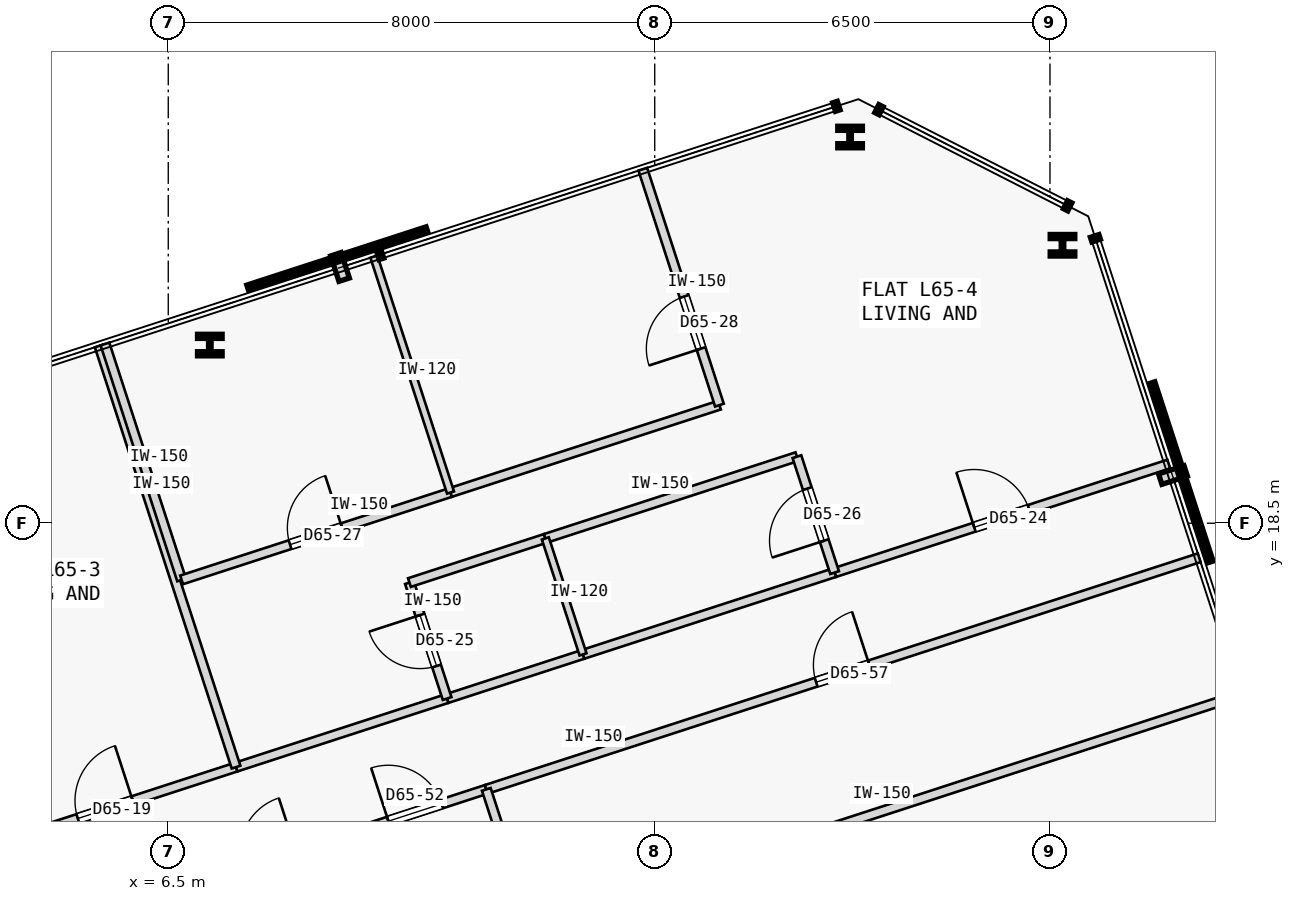
"""IFC4 building model, lengths in metres.
Left out: names, types, materials, properties, quantities, classifications, styles, units other than length and angle.
Written with IfcOpenShell. Run it as: python <this file> out.ifc"""

import sys

from ifc_helpers import new_model, si_unit, direction, frame, frame_2d, origin, origin_2d, place, context, subcontext, project, spatial, rectangle, i_section, extrude, element, fill, save


model = new_model("IFC4")
c1 = context("Model", 3, precision=1e-05, world=origin(), true_north=direction((0.0, 1.0)))
c2 = subcontext(c1, "Body", "Model", "MODEL_VIEW")
j1 = project(units=[si_unit("LENGTHUNIT", "METRE"), si_unit("PLANEANGLEUNIT", "RADIAN")], contexts=[c1])
p1 = place(None, origin())
s1 = spatial("IfcSite", under=j1, at=p1, CompositionType="ELEMENT")
p2 = place(p1, origin())
s2 = spatial("IfcBuilding", under=s1, at=p2, CompositionType="ELEMENT")
p3 = place(p2, frame((0.0, 0.0, 244.4)))
s3 = spatial("IfcBuildingStorey", under=s2, at=p3, CompositionType="ELEMENT", Elevation=244.4)
for number, where, z_axis, x_axis in (
    (1, (21.206, 23.071, 0.0), (0.0, 0.0, 1.0), (1.0, 0.0, 0.0)),
    (2, (17.713, 24.851, 0.0), (0.0, 0.0, 1.0), (1.0, 0.0, 0.0)),
    (3, (7.184, 21.43, 0.0), (0.0, 0.0, 1.0), (1.0, 0.0, 0.0)),
):
    element("IfcColumn", number, at=place(p3, frame(where, z_axis=z_axis, x_axis=x_axis)), inside=s3, PredefinedType="COLUMN", context=c2, shape_type="SweptSolid", body=[
        extrude(i_section(OverallWidth=0.405, OverallDepth=0.355, WebThickness=0.042, FlangeThickness=0.068, FilletRadius=0.015, at=origin_2d()), origin(), (0.0, 0.0, 1.0), 3.35),
    ])
p4 = place(p3, frame((3.314, 13.092, 0.0), z_axis=(0.0, 0.0, 1.0), x_axis=(0.951068976929, 0.308978641858, 0.0)))
e4 = element("IfcWall", 4, at=p4, inside=s3, PredefinedType="PARTITIONING", context=c2, shape_type="SweptSolid", body=[
    extrude(rectangle(XDim=4.522, YDim=0.15, at=frame_2d((2.261, 0.0))), origin(), (0.0, 0.0, 1.0), 3.125),
])
p5 = place(p4, frame((1.786, 0.0, 0.0)))
e5 = element("IfcOpeningElement", 5, at=p5, cuts=e4, PredefinedType="OPENING", context=c2, shape_type="SweptSolid", body=[
    extrude(rectangle(XDim=0.95, YDim=2.15, at=frame_2d((0.475, 1.075))), frame((0.0, 0.085, 0.0), z_axis=(0.0, -1.0, 0.0), x_axis=(1.0, 0.0, 0.0)), (0.0, 0.0, 1.0), 0.17),
])
p6 = place(p3, frame((7.615, 14.489, 0.0), z_axis=(0.0, 0.0, 1.0), x_axis=(0.951050780541, 0.309034646652, 0.0)))
e6 = element("IfcWall", 6, at=p6, inside=s3, PredefinedType="PARTITIONING", context=c2, shape_type="SweptSolid", body=[
    extrude(rectangle(XDim=3.65, YDim=0.15, at=frame_2d((1.825, 0.0))), origin(), (0.0, 0.0, 1.0), 3.125),
])
p7 = place(p3, frame((17.458, 17.688, 0.0), z_axis=(0.0, 0.0, 1.0), x_axis=(0.951064183239, 0.308993396953, 0.0)))
e7 = element("IfcWall", 7, at=p7, inside=s3, PredefinedType="PARTITIONING", context=c2, shape_type="SweptSolid", body=[
    extrude(rectangle(XDim=5.778, YDim=0.15, at=frame_2d((2.889, 0.0))), origin(), (0.0, 0.0, 1.0), 3.125),
])
p8 = place(p7, frame((2.414, 0.0, 0.0)))
e8 = element("IfcOpeningElement", 8, at=p8, cuts=e7, PredefinedType="OPENING", context=c2, shape_type="SweptSolid", body=[
    extrude(rectangle(XDim=0.95, YDim=2.15, at=frame_2d((0.475, 1.075))), frame((0.0, 0.085, 0.0), z_axis=(0.0, -1.0, 0.0), x_axis=(1.0, 0.0, 0.0)), (0.0, 0.0, 1.0), 0.17),
])
p9 = place(p3, frame((11.086, 15.617, 0.0), z_axis=(0.0, 0.0, 1.0), x_axis=(0.951045519245, 0.309050837767, 0.0)))
e9 = element("IfcWall", 9, at=p9, inside=s3, PredefinedType="PARTITIONING", context=c2, shape_type="SweptSolid", body=[
    extrude(rectangle(XDim=2.35, YDim=0.15, at=frame_2d((1.175, 0.0))), origin(), (0.0, 0.0, 1.0), 3.125),
])
p10 = place(p3, frame((13.321, 16.344, 0.0), z_axis=(0.0, 0.0, 1.0), x_axis=(0.951052627573, 0.309028962374, 0.0)))
e10 = element("IfcWall", 10, at=p10, inside=s3, PredefinedType="PARTITIONING", context=c2, shape_type="SweptSolid", body=[
    extrude(rectangle(XDim=4.35, YDim=0.15, at=frame_2d((2.175, 0.0))), origin(), (0.0, 0.0, 1.0), 3.125),
])
p11 = place(p3, frame((9.386, 13.362, 0.0), z_axis=(0.0, 0.0, 1.0), x_axis=(0.951052991774, 0.309027841526, 0.0)))
e11 = element("IfcWall", 11, at=p11, inside=s3, PredefinedType="PARTITIONING", context=c2, shape_type="SweptSolid", body=[
    extrude(rectangle(XDim=2.465, YDim=0.15, at=frame_2d((1.232, 0.0))), origin(), (0.0, 0.0, 1.0), 3.125),
])
p12 = place(p11, frame((0.772, 0.0, 0.0)))
e12 = element("IfcOpeningElement", 12, at=p12, cuts=e11, PredefinedType="OPENING", context=c2, shape_type="SweptSolid", body=[
    extrude(rectangle(XDim=0.92, YDim=2.15, at=frame_2d((0.46, 1.075))), frame((0.0, 0.085, 0.0), z_axis=(0.0, -1.0, 0.0), x_axis=(1.0, 0.0, 0.0)), (0.0, 0.0, 1.0), 0.17),
])
p13 = place(p3, frame((11.73, 14.123, 0.0), z_axis=(0.0, 0.0, 1.0), x_axis=(0.951060263663, 0.309005460926, 0.0)))
e13 = element("IfcWall", 13, at=p13, inside=s3, PredefinedType="PARTITIONING", context=c2, shape_type="SweptSolid", body=[
    extrude(rectangle(XDim=12.327, YDim=0.15, at=frame_2d((6.164, 0.0))), origin(), (0.0, 0.0, 1.0), 3.125),
])
p14 = place(p13, frame((5.704, 0.0, 0.0)))
e14 = element("IfcOpeningElement", 14, at=p14, cuts=e13, PredefinedType="OPENING", context=c2, shape_type="SweptSolid", body=[
    extrude(rectangle(XDim=0.92, YDim=2.15, at=frame_2d((0.46, 1.075))), frame((0.0, 0.085, 0.0), z_axis=(0.0, -1.0, 0.0), x_axis=(1.0, 0.0, 0.0)), (0.0, 0.0, 1.0), 0.17),
])
p15 = place(p3, frame((7.615, 14.489, 0.0), z_axis=(0.0, 0.0, 1.0), x_axis=(-0.309029230739, 0.951052540372, 0.0)))
e15 = element("IfcWall", 15, at=p15, inside=s3, PredefinedType="PARTITIONING", context=c2, shape_type="SweptSolid", body=[
    extrude(rectangle(XDim=7.284, YDim=0.15, at=frame_2d((3.642, 0.0))), origin(), (0.0, 0.0, 1.0), 3.125),
])
p16 = place(p3, frame((11.086, 15.617, 0.0), z_axis=(0.0, 0.0, 1.0), x_axis=(-0.309022749039, 0.951054646472, 0.0)))
e16 = element("IfcWall", 16, at=p16, inside=s3, PredefinedType="PARTITIONING", context=c2, shape_type="SweptSolid", body=[
    extrude(rectangle(XDim=2.005, YDim=0.15, at=frame_2d((1.002, 0.0))), origin(), (0.0, 0.0, 1.0), 3.125),
])
p17 = place(p16, frame((0.562, 0.0, 0.0)))
e17 = element("IfcOpeningElement", 17, at=p17, cuts=e16, PredefinedType="OPENING", context=c2, shape_type="SweptSolid", body=[
    extrude(rectangle(XDim=0.88, YDim=2.15, at=frame_2d((0.44, 1.075))), frame((0.0, 0.085, 0.0), z_axis=(0.0, -1.0, 0.0), x_axis=(1.0, 0.0, 0.0)), (0.0, 0.0, 1.0), 0.17),
])
p18 = place(p3, frame((10.466, 17.524, 0.0), z_axis=(0.0, 0.0, 1.0), x_axis=(0.951076048914, 0.308956872689, 0.0)))
e18 = element("IfcWall", 18, at=p18, inside=s3, PredefinedType="PARTITIONING", context=c2, shape_type="SweptSolid", body=[
    extrude(rectangle(XDim=2.35, YDim=0.15, at=frame_2d((1.175, 0.0))), origin(), (0.0, 0.0, 1.0), 3.125),
])
p19 = place(p3, frame((12.701, 18.25, 0.0), z_axis=(0.0, 0.0, 1.0), x_axis=(0.951052627573, 0.309028962374, 0.0)))
e19 = element("IfcWall", 19, at=p19, inside=s3, PredefinedType="PARTITIONING", context=c2, shape_type="SweptSolid", body=[
    extrude(rectangle(XDim=4.35, YDim=0.15, at=frame_2d((2.175, 0.0))), origin(), (0.0, 0.0, 1.0), 3.125),
])
p20 = place(p3, frame((17.458, 17.688, 0.0), z_axis=(0.0, 0.0, 1.0), x_axis=(-0.309058537449, 0.951043017129, 0.0)))
e20 = element("IfcWall", 20, at=p20, inside=s3, PredefinedType="PARTITIONING", context=c2, shape_type="SweptSolid", body=[
    extrude(rectangle(XDim=2.005, YDim=0.15, at=frame_2d((1.002, 0.0))), origin(), (0.0, 0.0, 1.0), 3.125),
])
p21 = place(p20, frame((0.552, 0.0, 0.0)))
e21 = element("IfcOpeningElement", 21, at=p21, cuts=e20, PredefinedType="OPENING", context=c2, shape_type="SweptSolid", body=[
    extrude(rectangle(XDim=0.9, YDim=2.15, at=frame_2d((0.45, 1.075))), frame((0.0, 0.085, 0.0), z_axis=(0.0, -1.0, 0.0), x_axis=(1.0, 0.0, 0.0)), (0.0, 0.0, 1.0), 0.17),
])
p22 = place(p3, frame((6.719, 17.568, 0.0), z_axis=(0.0, 0.0, 1.0), x_axis=(-0.309018403393, 0.951056058476, 0.0)))
e22 = element("IfcWall", 22, at=p22, inside=s3, PredefinedType="PARTITIONING", context=c2, shape_type="SweptSolid", body=[
    extrude(rectangle(XDim=4.079, YDim=0.15, at=frame_2d((2.04, 0.0))), origin(), (0.0, 0.0, 1.0), 3.125),
])
p23 = place(p3, frame((6.719, 17.568, 0.0), z_axis=(0.0, 0.0, 1.0), x_axis=(0.951050272606, 0.309036209813, 0.0)))
e23 = element("IfcWall", 23, at=p23, inside=s3, PredefinedType="PARTITIONING", context=c2, shape_type="SweptSolid", body=[
    extrude(rectangle(XDim=4.65, YDim=0.15, at=frame_2d((2.325, 0.0))), origin(), (0.0, 0.0, 1.0), 3.125),
])
p24 = place(p23, frame((1.875, 0.0, 0.0)))
e24 = element("IfcOpeningElement", 24, at=p24, cuts=e23, PredefinedType="OPENING", context=c2, shape_type="SweptSolid", body=[
    extrude(rectangle(XDim=0.9, YDim=2.15, at=frame_2d((0.45, 1.075))), frame((0.0, 0.085, 0.0), z_axis=(0.0, -1.0, 0.0), x_axis=(1.0, 0.0, 0.0)), (0.0, 0.0, 1.0), 0.17),
])
p25 = place(p3, frame((11.142, 19.005, 0.0), z_axis=(0.0, 0.0, 1.0), x_axis=(0.951065702951, 0.308988719326, 0.0)))
e25 = element("IfcWall", 25, at=p25, inside=s3, PredefinedType="PARTITIONING", context=c2, shape_type="SweptSolid", body=[
    extrude(rectangle(XDim=4.65, YDim=0.15, at=frame_2d((2.325, 0.0))), origin(), (0.0, 0.0, 1.0), 3.125),
])
p26 = place(p3, frame((15.564, 20.442, 0.0), z_axis=(0.0, 0.0, 1.0), x_axis=(-0.309018403393, 0.951056058476, 0.0)))
e26 = element("IfcWall", 26, at=p26, inside=s3, PredefinedType="PARTITIONING", context=c2, shape_type="SweptSolid", body=[
    extrude(rectangle(XDim=4.079, YDim=0.15, at=frame_2d((2.04, 0.0))), origin(), (0.0, 0.0, 1.0), 3.125),
])
p27 = place(p26, frame((0.978, 0.0, 0.0)))
e27 = element("IfcOpeningElement", 27, at=p27, cuts=e26, PredefinedType="OPENING", context=c2, shape_type="SweptSolid", body=[
    extrude(rectangle(XDim=0.9, YDim=2.15, at=frame_2d((0.45, 1.075))), frame((0.0, 0.085, 0.0), z_axis=(0.0, -1.0, 0.0), x_axis=(1.0, 0.0, 0.0)), (0.0, 0.0, 1.0), 0.17),
])
p28 = place(p3, frame((13.321, 16.344, 0.0), z_axis=(0.0, 0.0, 1.0), x_axis=(-0.309058537449, 0.951043017129, 0.0)))
e28 = element("IfcWall", 28, at=p28, inside=s3, PredefinedType="PARTITIONING", context=c2, shape_type="SweptSolid", body=[
    extrude(rectangle(XDim=2.005, YDim=0.12, at=frame_2d((1.002, 0.0))), origin(), (0.0, 0.0, 1.0), 3.125),
])
p29 = place(p3, frame((11.142, 19.005, 0.0), z_axis=(0.0, 0.0, 1.0), x_axis=(-0.309018403393, 0.951056058476, 0.0)))
e29 = element("IfcWall", 29, at=p29, inside=s3, PredefinedType="PARTITIONING", context=c2, shape_type="SweptSolid", body=[
    extrude(rectangle(XDim=4.079, YDim=0.12, at=frame_2d((2.04, 0.0))), origin(), (0.0, 0.0, 1.0), 3.125),
])
p30 = place(p3, frame((12.458, 11.885, 0.0), z_axis=(0.0, 0.0, 1.0), x_axis=(-0.309062621189, 0.951041690035, 0.0)))
e30 = element("IfcWall", 30, at=p30, inside=s3, PredefinedType="PARTITIONING", context=c2, shape_type="SweptSolid", body=[
    extrude(rectangle(XDim=2.354, YDim=0.15, at=frame_2d((1.177, 0.0))), origin(), (0.0, 0.0, 1.0), 3.125),
])
p31 = place(p3, frame((12.458, 11.885, 0.0), z_axis=(0.0, 0.0, 1.0), x_axis=(0.951060263663, 0.309005460926, 0.0)))
e31 = element("IfcWall", 31, at=p31, inside=s3, PredefinedType="PARTITIONING", context=c2, shape_type="SweptSolid", body=[
    extrude(rectangle(XDim=12.327, YDim=0.15, at=frame_2d((6.164, 0.0))), origin(), (0.0, 0.0, 1.0), 3.125),
])
p32 = place(p5, origin())
e32 = element("IfcDoor", 32, at=p32, inside=s3, OperationType="SINGLE_SWING_RIGHT", PredefinedType="DOOR", context=c2, shape_type="SweptSolid", body=[
    extrude(rectangle(XDim=0.95, YDim=2.15, at=frame_2d((0.475, 1.075))), frame((0.0, 0.025, 0.0), z_axis=(0.0, -1.0, 0.0), x_axis=(1.0, 0.0, 0.0)), (0.0, 0.0, 1.0), 0.05),
])
fill(e5, e32)
p33 = place(p8, origin())
e33 = element("IfcDoor", 33, at=p33, inside=s3, OperationType="SINGLE_SWING_LEFT", PredefinedType="DOOR", context=c2, shape_type="SweptSolid", body=[
    extrude(rectangle(XDim=0.95, YDim=2.15, at=frame_2d((0.475, 1.075))), frame((0.0, 0.025, 0.0), z_axis=(0.0, -1.0, 0.0), x_axis=(1.0, 0.0, 0.0)), (0.0, 0.0, 1.0), 0.05),
])
fill(e8, e33)
p34 = place(p17, origin())
e34 = element("IfcDoor", 34, at=p34, inside=s3, OperationType="SINGLE_SWING_RIGHT", PredefinedType="DOOR", context=c2, shape_type="SweptSolid", body=[
    extrude(rectangle(XDim=0.88, YDim=2.15, at=frame_2d((0.44, 1.075))), frame((0.0, 0.025, 0.0), z_axis=(0.0, -1.0, 0.0), x_axis=(1.0, 0.0, 0.0)), (0.0, 0.0, 1.0), 0.05),
])
fill(e17, e34)
p35 = place(p21, origin())
e35 = element("IfcDoor", 35, at=p35, inside=s3, OperationType="SINGLE_SWING_LEFT", PredefinedType="DOOR", context=c2, shape_type="SweptSolid", body=[
    extrude(rectangle(XDim=0.9, YDim=2.15, at=frame_2d((0.45, 1.075))), frame((0.0, 0.025, 0.0), z_axis=(0.0, -1.0, 0.0), x_axis=(1.0, 0.0, 0.0)), (0.0, 0.0, 1.0), 0.05),
])
fill(e21, e35)
p36 = place(p24, origin())
e36 = element("IfcDoor", 36, at=p36, inside=s3, OperationType="SINGLE_SWING_RIGHT", PredefinedType="DOOR", context=c2, shape_type="SweptSolid", body=[
    extrude(rectangle(XDim=0.9, YDim=2.15, at=frame_2d((0.45, 1.075))), frame((0.0, 0.025, 0.0), z_axis=(0.0, -1.0, 0.0), x_axis=(1.0, 0.0, 0.0)), (0.0, 0.0, 1.0), 0.05),
])
fill(e24, e36)
p37 = place(p27, origin())
e37 = element("IfcDoor", 37, at=p37, inside=s3, OperationType="SINGLE_SWING_LEFT", PredefinedType="DOOR", context=c2, shape_type="SweptSolid", body=[
    extrude(rectangle(XDim=0.9, YDim=2.15, at=frame_2d((0.45, 1.075))), frame((0.0, 0.025, 0.0), z_axis=(0.0, -1.0, 0.0), x_axis=(1.0, 0.0, 0.0)), (0.0, 0.0, 1.0), 0.05),
])
fill(e27, e37)
p38 = place(p12, origin())
e38 = element("IfcDoor", 38, at=p38, inside=s3, OperationType="SINGLE_SWING_LEFT", PredefinedType="DOOR", context=c2, shape_type="SweptSolid", body=[
    extrude(rectangle(XDim=0.92, YDim=2.15, at=frame_2d((0.46, 1.075))), frame((0.0, 0.025, 0.0), z_axis=(0.0, -1.0, 0.0), x_axis=(1.0, 0.0, 0.0)), (0.0, 0.0, 1.0), 0.05),
])
fill(e12, e38)
p39 = place(p14, origin())
e39 = element("IfcDoor", 39, at=p39, inside=s3, OperationType="SINGLE_SWING_RIGHT", PredefinedType="DOOR", context=c2, shape_type="SweptSolid", body=[
    extrude(rectangle(XDim=0.92, YDim=2.15, at=frame_2d((0.46, 1.075))), frame((0.0, 0.025, 0.0), z_axis=(0.0, -1.0, 0.0), x_axis=(1.0, 0.0, 0.0)), (0.0, 0.0, 1.0), 0.05),
])
fill(e14, e39)
save(model, sys.argv[1])
